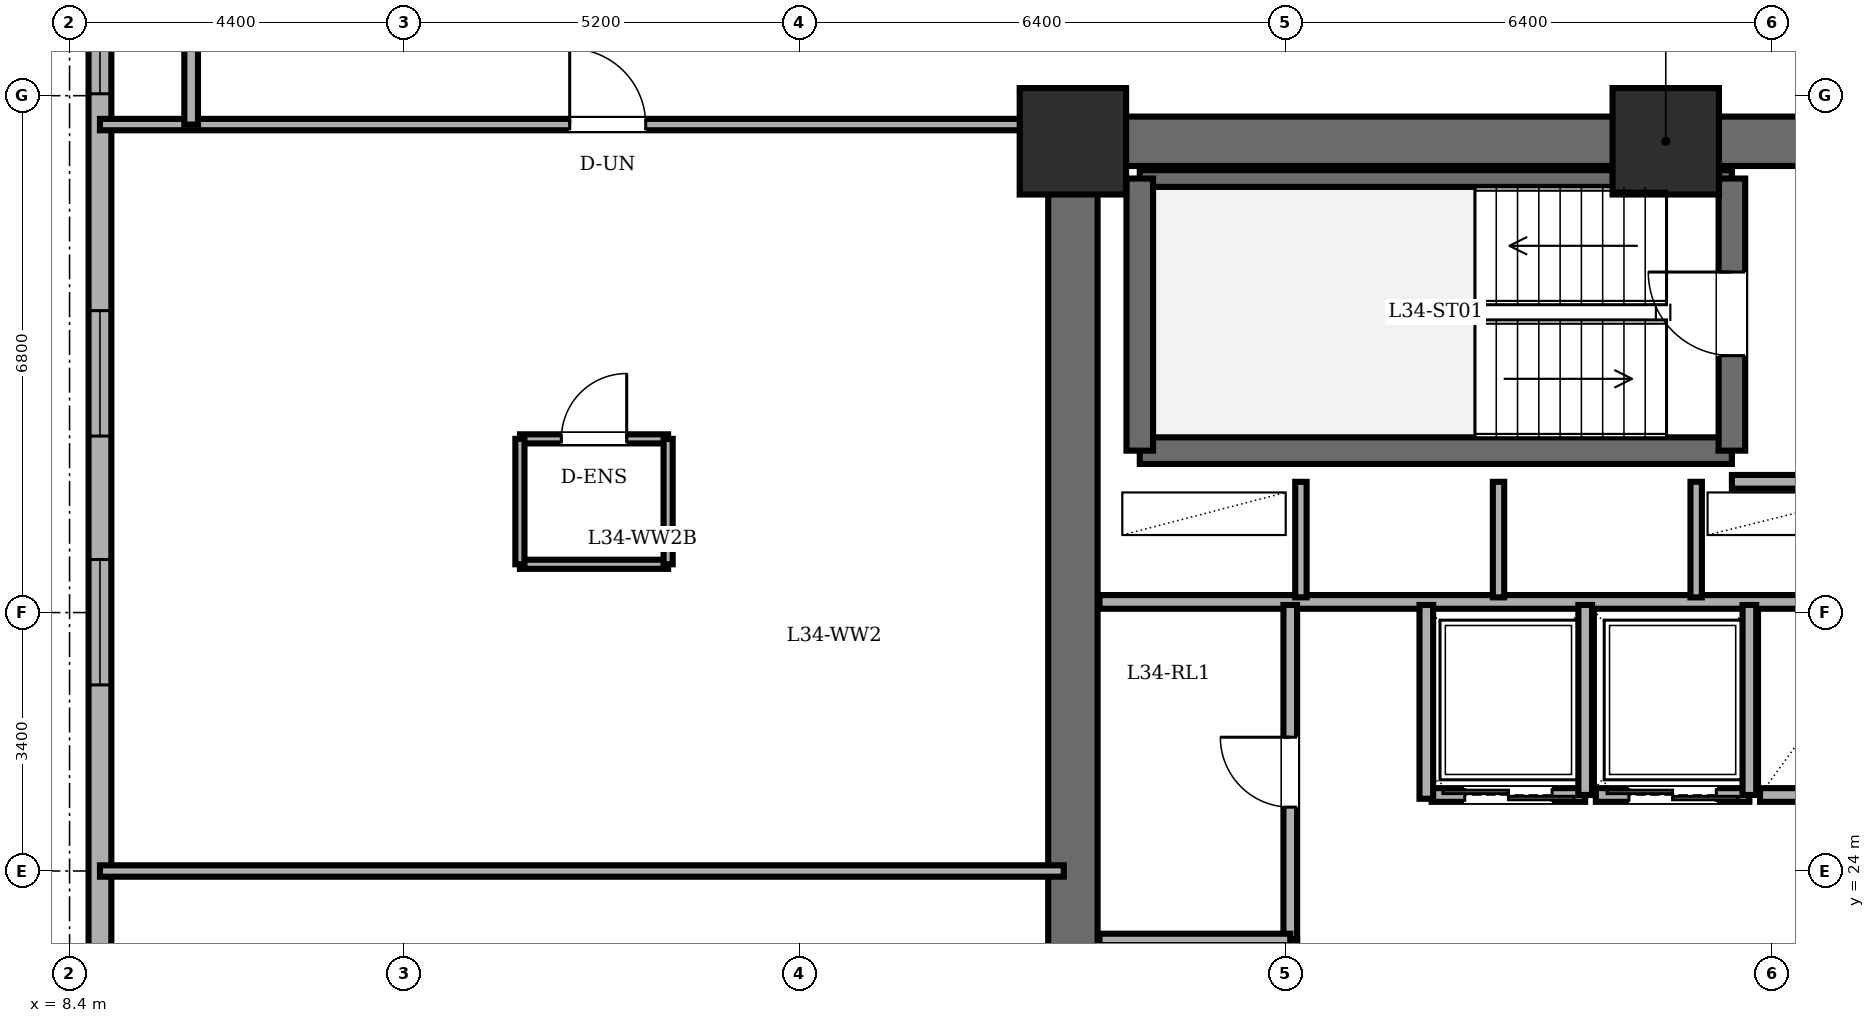
"""IFC4 building model, lengths in metres.
Left out: names, types, materials, properties, quantities, classifications, styles, units other than length and angle.
Written with IfcOpenShell. Run it as: python <this file> out.ifc"""

import sys

from ifc_helpers import new_model, si_unit, direction, frame, frame_2d, origin, origin_2d, place, context, subcontext, project, spatial, rectangle, extrude, element, fill, save


model = new_model("IFC4")
c1 = context("Model", 3, precision=1e-05, world=origin(), true_north=direction((0.0, 1.0)))
c2 = subcontext(c1, "Body", "Model", "MODEL_VIEW")
j1 = project(units=[si_unit("LENGTHUNIT", "METRE"), si_unit("PLANEANGLEUNIT", "RADIAN")], contexts=[c1])
p1 = place(None, origin())
s1 = spatial("IfcSite", under=j1, at=p1, CompositionType="ELEMENT")
p2 = place(p1, origin())
s2 = spatial("IfcBuilding", under=s1, at=p2, CompositionType="ELEMENT")
p3 = place(p2, frame((0.0, 0.0, 129.5)))
s3 = spatial("IfcBuildingStorey", under=s2, at=p3, CompositionType="ELEMENT", Elevation=129.5)
for number, where, z_axis, x_axis in (
    (1, (29.4, 33.6, 0.0), (0.0, 0.0, 1.0), (1.0, 0.0, 0.0)),
    (2, (21.6, 33.6, 0.0), (0.0, 0.0, 1.0), (1.0, 0.0, 0.0)),
):
    element("IfcColumn", number, at=place(p3, frame(where, z_axis=z_axis, x_axis=x_axis)), inside=s3, PredefinedType="COLUMN", context=c2, shape_type="SweptSolid", body=[
        extrude(rectangle(XDim=1.4, YDim=1.4, at=origin_2d()), origin(), (0.0, 0.0, 1.0), 3.6),
    ])
p4 = place(p3, frame((8.8, 38.2, 0.0), z_axis=(0.0, 0.0, 1.0), x_axis=(0.0, -1.0, 0.0)))
e3 = element("IfcWall", 3, at=p4, inside=s3, PredefinedType="SOLIDWALL", context=c2, shape_type="SweptSolid", body=[
    extrude(rectangle(XDim=28.4, YDim=0.3, at=frame_2d((14.2, 0.0))), origin(), (0.0, 0.0, 1.0), 3.36),
])
p5 = place(p4, frame((2.325, 0.0, 0.85)))
e4 = element("IfcOpeningElement", 4, at=p5, cuts=e3, PredefinedType="OPENING", context=c2, shape_type="SweptSolid", body=[
    extrude(rectangle(XDim=1.65, YDim=1.55, at=frame_2d((0.825, 0.775))), frame((0.0, 0.16, 0.0), z_axis=(0.0, -1.0, 0.0), x_axis=(1.0, 0.0, 0.0)), (0.0, 0.0, 1.0), 0.32),
])
p6 = place(p4, frame((6.828, 0.0, 0.85)))
e5 = element("IfcOpeningElement", 5, at=p6, cuts=e3, PredefinedType="OPENING", context=c2, shape_type="SweptSolid", body=[
    extrude(rectangle(XDim=1.65, YDim=1.55, at=frame_2d((0.825, 0.775))), frame((0.0, 0.16, 0.0), z_axis=(0.0, -1.0, 0.0), x_axis=(1.0, 0.0, 0.0)), (0.0, 0.0, 1.0), 0.32),
])
p7 = place(p4, frame((10.102, 0.0, 0.85)))
e6 = element("IfcOpeningElement", 6, at=p7, cuts=e3, PredefinedType="OPENING", context=c2, shape_type="SweptSolid", body=[
    extrude(rectangle(XDim=1.65, YDim=1.55, at=frame_2d((0.825, 0.775))), frame((0.0, 0.16, 0.0), z_axis=(0.0, -1.0, 0.0), x_axis=(1.0, 0.0, 0.0)), (0.0, 0.0, 1.0), 0.32),
])
p8 = place(p4, frame((16.648, 0.0, 0.85)))
e7 = element("IfcOpeningElement", 7, at=p8, cuts=e3, PredefinedType="OPENING", context=c2, shape_type="SweptSolid", body=[
    extrude(rectangle(XDim=1.65, YDim=1.55, at=frame_2d((0.825, 0.775))), frame((0.0, 0.16, 0.0), z_axis=(0.0, -1.0, 0.0), x_axis=(1.0, 0.0, 0.0)), (0.0, 0.0, 1.0), 0.32),
])
p9 = place(p4, frame((19.922, 0.0, 0.85)))
e8 = element("IfcOpeningElement", 8, at=p9, cuts=e3, PredefinedType="OPENING", context=c2, shape_type="SweptSolid", body=[
    extrude(rectangle(XDim=1.65, YDim=1.55, at=frame_2d((0.825, 0.775))), frame((0.0, 0.16, 0.0), z_axis=(0.0, -1.0, 0.0), x_axis=(1.0, 0.0, 0.0)), (0.0, 0.0, 1.0), 0.32),
])
p10 = place(p4, frame((24.425, 0.0, 0.85)))
e9 = element("IfcOpeningElement", 9, at=p10, cuts=e3, PredefinedType="OPENING", context=c2, shape_type="SweptSolid", body=[
    extrude(rectangle(XDim=1.65, YDim=1.55, at=frame_2d((0.825, 0.775))), frame((0.0, 0.16, 0.0), z_axis=(0.0, -1.0, 0.0), x_axis=(1.0, 0.0, 0.0)), (0.0, 0.0, 1.0), 0.32),
])
p11 = place(p3, frame((21.6, 14.4, 0.0), z_axis=(0.0, 0.0, 1.0), x_axis=(0.0, 1.0, 0.0)))
e10 = element("IfcWall", 10, at=p11, inside=s3, PredefinedType="SHEAR", context=c2, shape_type="SweptSolid", body=[
    extrude(rectangle(XDim=19.2, YDim=0.65, at=frame_2d((9.6, 0.0))), origin(), (0.0, 0.0, 1.0), 3.36),
])
p12 = place(p3, frame((21.6, 33.6, 0.0), z_axis=(0.0, 0.0, 1.0), x_axis=(1.0, 0.0, 0.0)))
e11 = element("IfcWall", 11, at=p12, inside=s3, PredefinedType="SHEAR", context=c2, shape_type="SweptSolid", body=[
    extrude(rectangle(XDim=15.6, YDim=0.65, at=frame_2d((7.8, 0.0))), origin(), (0.0, 0.0, 1.0), 3.36),
])
p13 = place(p3, frame((22.48, 29.53, 0.0), z_axis=(0.0, 0.0, 1.0), x_axis=(1.0, 0.0, 0.0)))
e12 = element("IfcWall", 12, at=p13, inside=s3, PredefinedType="SOLIDWALL", context=c2, shape_type="SweptSolid", body=[
    extrude(rectangle(XDim=7.79, YDim=0.35, at=frame_2d((3.895, 0.0))), origin(), (0.0, 0.0, 1.0), 3.36),
])
p14 = place(p3, frame((22.48, 33.11, 0.0), z_axis=(0.0, 0.0, 1.0), x_axis=(1.0, 0.0, 0.0)))
e13 = element("IfcWall", 13, at=p14, inside=s3, PredefinedType="PARTITIONING", context=c2, shape_type="SweptSolid", body=[
    extrude(rectangle(XDim=7.79, YDim=0.22, at=frame_2d((3.895, 0.0))), origin(), (0.0, 0.0, 1.0), 3.36),
])
p15 = place(p3, frame((22.48, 29.53, 0.0), z_axis=(0.0, 0.0, 1.0), x_axis=(0.0, 1.0, 0.0)))
e14 = element("IfcWall", 14, at=p15, inside=s3, PredefinedType="SOLIDWALL", context=c2, shape_type="SweptSolid", body=[
    extrude(rectangle(XDim=3.58, YDim=0.35, at=frame_2d((1.79, 0.0))), origin(), (0.0, 0.0, 1.0), 3.36),
])
p16 = place(p3, frame((30.27, 29.53, 0.0), z_axis=(0.0, 0.0, 1.0), x_axis=(0.0, 1.0, 0.0)))
e15 = element("IfcWall", 15, at=p16, inside=s3, PredefinedType="SOLIDWALL", context=c2, shape_type="SweptSolid", body=[
    extrude(rectangle(XDim=3.58, YDim=0.35, at=frame_2d((1.79, 0.0))), origin(), (0.0, 0.0, 1.0), 3.36),
])
p17 = place(p16, frame((1.25, 0.0, 0.0)))
e16 = element("IfcOpeningElement", 16, at=p17, cuts=e15, PredefinedType="OPENING", context=c2, shape_type="SweptSolid", body=[
    extrude(rectangle(XDim=1.1, YDim=2.15, at=frame_2d((0.55, 1.075))), frame((0.0, 0.185, 0.0), z_axis=(0.0, -1.0, 0.0), x_axis=(1.0, 0.0, 0.0)), (0.0, 0.0, 1.0), 0.37),
])
p18 = place(p3, frame((30.27, 29.12, 0.0), z_axis=(0.0, 0.0, 1.0), x_axis=(1.0, 0.0, 0.0)))
e17 = element("IfcWall", 17, at=p18, inside=s3, PredefinedType="PARTITIONING", context=c2, shape_type="SweptSolid", body=[
    extrude(rectangle(XDim=2.24, YDim=0.18, at=frame_2d((1.12, 0.0))), origin(), (0.0, 0.0, 1.0), 3.36),
])
p19 = place(p3, frame((21.95, 27.54, 0.0), z_axis=(0.0, 0.0, 1.0), x_axis=(1.0, 0.0, 0.0)))
e18 = element("IfcWall", 18, at=p19, inside=s3, PredefinedType="PARTITIONING", context=c2, shape_type="SweptSolid", body=[
    extrude(rectangle(XDim=10.56, YDim=0.18, at=frame_2d((5.28, 0.0))), origin(), (0.0, 0.0, 1.0), 3.36),
])
for number, where, z_axis, x_axis in (
    (19, (24.6, 27.6, 0.0), (0.0, 0.0, 1.0), (0.0, 1.0, 0.0)),
    (20, (27.2, 27.6, 0.0), (0.0, 0.0, 1.0), (0.0, 1.0, 0.0)),
    (21, (29.8, 27.6, 0.0), (0.0, 0.0, 1.0), (0.0, 1.0, 0.0)),
):
    element("IfcWall", number, at=place(p3, frame(where, z_axis=z_axis, x_axis=x_axis)), inside=s3, PredefinedType="PARTITIONING", context=c2, shape_type="SweptSolid", body=[
        extrude(rectangle(XDim=1.52, YDim=0.15, at=frame_2d((0.76, 0.0))), origin(), (0.0, 0.0, 1.0), 3.36),
    ])
p20 = place(p3, frame((28.34, 25.0, 0.0), z_axis=(0.0, 0.0, 1.0), x_axis=(-1.0, 0.0, 0.0)))
e22 = element("IfcWall", 22, at=p20, inside=s3, PredefinedType="PARTITIONING", context=c2, shape_type="SweptSolid", body=[
    extrude(rectangle(XDim=2.02, YDim=0.18, at=frame_2d((1.01, 0.0))), origin(), (0.0, 0.0, 1.0), 3.36),
])
p21 = place(p20, frame((0.435, 0.0, 0.0)))
e23 = element("IfcOpeningElement", 23, at=p21, cuts=e22, PredefinedType="OPENING", context=c2, shape_type="SweptSolid", body=[
    extrude(rectangle(XDim=1.15, YDim=2.2, at=frame_2d((0.575, 1.1))), frame((0.0, 0.1, 0.0), z_axis=(0.0, -1.0, 0.0), x_axis=(1.0, 0.0, 0.0)), (0.0, 0.0, 1.0), 0.2),
])
p22 = place(p3, frame((28.34, 25.0, 0.0), z_axis=(0.0, 0.0, 1.0), x_axis=(0.0, 1.0, 0.0)))
e24 = element("IfcWall", 24, at=p22, inside=s3, PredefinedType="PARTITIONING", context=c2, shape_type="SweptSolid", body=[
    extrude(rectangle(XDim=2.5, YDim=0.18, at=frame_2d((1.25, 0.0))), origin(), (0.0, 0.0, 1.0), 3.36),
])
p23 = place(p3, frame((30.5, 25.0, 0.0), z_axis=(0.0, 0.0, 1.0), x_axis=(-1.0, 0.0, 0.0)))
e25 = element("IfcWall", 25, at=p23, inside=s3, PredefinedType="PARTITIONING", context=c2, shape_type="SweptSolid", body=[
    extrude(rectangle(XDim=2.02, YDim=0.18, at=frame_2d((1.01, 0.0))), origin(), (0.0, 0.0, 1.0), 3.36),
])
p24 = place(p23, frame((0.435, 0.0, 0.0)))
e26 = element("IfcOpeningElement", 26, at=p24, cuts=e25, PredefinedType="OPENING", context=c2, shape_type="SweptSolid", body=[
    extrude(rectangle(XDim=1.15, YDim=2.2, at=frame_2d((0.575, 1.1))), frame((0.0, 0.1, 0.0), z_axis=(0.0, -1.0, 0.0), x_axis=(1.0, 0.0, 0.0)), (0.0, 0.0, 1.0), 0.2),
])
p25 = place(p3, frame((30.5, 25.0, 0.0), z_axis=(0.0, 0.0, 1.0), x_axis=(0.0, 1.0, 0.0)))
e27 = element("IfcWall", 27, at=p25, inside=s3, PredefinedType="PARTITIONING", context=c2, shape_type="SweptSolid", body=[
    extrude(rectangle(XDim=2.5, YDim=0.18, at=frame_2d((1.25, 0.0))), origin(), (0.0, 0.0, 1.0), 3.36),
])
p26 = place(p3, frame((32.46, 25.0, 0.0), z_axis=(0.0, 0.0, 1.0), x_axis=(-1.0, 0.0, 0.0)))
e28 = element("IfcWall", 28, at=p26, inside=s3, PredefinedType="PARTITIONING", context=c2, shape_type="SweptSolid", body=[
    extrude(rectangle(XDim=1.82, YDim=0.18, at=frame_2d((0.91, 0.0))), origin(), (0.0, 0.0, 1.0), 3.36),
])
p27 = place(p3, frame((24.46, 23.1, 0.0), z_axis=(0.0, 0.0, 1.0), x_axis=(0.0, 1.0, 0.0)))
e29 = element("IfcWall", 29, at=p27, inside=s3, PredefinedType="PARTITIONING", context=c2, shape_type="SweptSolid", body=[
    extrude(rectangle(XDim=4.4, YDim=0.18, at=frame_2d((2.2, 0.0))), origin(), (0.0, 0.0, 1.0), 3.36),
])
p28 = place(p27, frame((1.74, 0.0, 0.0)))
e30 = element("IfcOpeningElement", 30, at=p28, cuts=e29, PredefinedType="OPENING", context=c2, shape_type="SweptSolid", body=[
    extrude(rectangle(XDim=0.92, YDim=2.1, at=frame_2d((0.46, 1.05))), frame((0.0, 0.1, 0.0), z_axis=(0.0, -1.0, 0.0), x_axis=(1.0, 0.0, 0.0)), (0.0, 0.0, 1.0), 0.2),
])
p29 = place(p3, frame((24.46, 19.8, 0.0), z_axis=(0.0, 0.0, 1.0), x_axis=(0.0, 1.0, 0.0)))
e31 = element("IfcWall", 31, at=p29, inside=s3, PredefinedType="PARTITIONING", context=c2, shape_type="SweptSolid", body=[
    extrude(rectangle(XDim=3.3, YDim=0.18, at=frame_2d((1.65, 0.0))), origin(), (0.0, 0.0, 1.0), 3.36),
])
p30 = place(p29, frame((1.19, 0.0, 0.0)))
e32 = element("IfcOpeningElement", 32, at=p30, cuts=e31, PredefinedType="OPENING", context=c2, shape_type="SweptSolid", body=[
    extrude(rectangle(XDim=0.92, YDim=2.1, at=frame_2d((0.46, 1.05))), frame((0.0, 0.1, 0.0), z_axis=(0.0, -1.0, 0.0), x_axis=(1.0, 0.0, 0.0)), (0.0, 0.0, 1.0), 0.2),
])
p31 = place(p3, frame((21.95, 23.1, 0.0), z_axis=(0.0, 0.0, 1.0), x_axis=(1.0, 0.0, 0.0)))
e33 = element("IfcWall", 33, at=p31, inside=s3, PredefinedType="PARTITIONING", context=c2, shape_type="SweptSolid", body=[
    extrude(rectangle(XDim=2.51, YDim=0.15, at=frame_2d((1.255, 0.0))), origin(), (0.0, 0.0, 1.0), 3.36),
])
p32 = place(p3, frame((26.25, 24.95, 0.0), z_axis=(0.0, 0.0, 1.0), x_axis=(0.0, 1.0, 0.0)))
e34 = element("IfcWall", 34, at=p32, inside=s3, PredefinedType="PARTITIONING", context=c2, shape_type="SweptSolid", body=[
    extrude(rectangle(XDim=2.55, YDim=0.18, at=frame_2d((1.275, 0.0))), origin(), (0.0, 0.0, 1.0), 3.36),
])
p33 = place(p3, frame((14.325, 29.685, 0.0), z_axis=(0.0, 0.0, 1.0), x_axis=(1.0, 0.0, 0.0)))
e35 = element("IfcWall", 35, at=p33, inside=s3, PredefinedType="PARTITIONING", context=c2, shape_type="SweptSolid", body=[
    extrude(rectangle(XDim=1.95, YDim=0.12, at=frame_2d((0.975, 0.0))), origin(), (0.0, 0.0, 1.0), 3.36),
])
p34 = place(p33, frame((0.545, 0.0, 0.0)))
e36 = element("IfcOpeningElement", 36, at=p34, cuts=e35, PredefinedType="OPENING", context=c2, shape_type="SweptSolid", body=[
    extrude(rectangle(XDim=0.86, YDim=2.1, at=frame_2d((0.43, 1.05))), frame((0.0, 0.07, 0.0), z_axis=(0.0, -1.0, 0.0), x_axis=(1.0, 0.0, 0.0)), (0.0, 0.0, 1.0), 0.14),
])
p35 = place(p3, frame((16.275, 28.035, 0.0), z_axis=(0.0, 0.0, 1.0), x_axis=(-1.0, 0.0, 0.0)))
e37 = element("IfcWall", 37, at=p35, inside=s3, PredefinedType="PARTITIONING", context=c2, shape_type="SweptSolid", body=[
    extrude(rectangle(XDim=1.95, YDim=0.12, at=frame_2d((0.975, 0.0))), origin(), (0.0, 0.0, 1.0), 3.36),
])
for number, where, z_axis, x_axis in (
    (38, (14.325, 29.685, 0.0), (0.0, 0.0, 1.0), (0.0, -1.0, 0.0)),
    (39, (16.275, 28.035, 0.0), (0.0, 0.0, 1.0), (0.0, 1.0, 0.0)),
):
    element("IfcWall", number, at=place(p3, frame(where, z_axis=z_axis, x_axis=x_axis)), inside=s3, PredefinedType="PARTITIONING", context=c2, shape_type="SweptSolid", body=[
        extrude(rectangle(XDim=1.65, YDim=0.12, at=frame_2d((0.825, 0.0))), origin(), (0.0, 0.0, 1.0), 3.36),
    ])
p36 = place(p3, frame((8.8, 24.0, 0.0), z_axis=(0.0, 0.0, 1.0), x_axis=(1.0, 0.0, 0.0)))
e40 = element("IfcWall", 40, at=p36, inside=s3, PredefinedType="PARTITIONING", context=c2, shape_type="SweptSolid", body=[
    extrude(rectangle(XDim=12.68, YDim=0.15, at=frame_2d((6.34, 0.0))), origin(), (0.0, 0.0, 1.0), 3.36),
])
p37 = place(p3, frame((8.8, 33.82, 0.0), z_axis=(0.0, 0.0, 1.0), x_axis=(1.0, 0.0, 0.0)))
e41 = element("IfcWall", 41, at=p37, inside=s3, PredefinedType="PARTITIONING", context=c2, shape_type="SweptSolid", body=[
    extrude(rectangle(XDim=12.68, YDim=0.15, at=frame_2d((6.34, 0.0))), origin(), (0.0, 0.0, 1.0), 3.36),
])
p38 = place(p37, frame((6.18, 0.0, 0.0)))
e42 = element("IfcOpeningElement", 42, at=p38, cuts=e41, PredefinedType="OPENING", context=c2, shape_type="SweptSolid", body=[
    extrude(rectangle(XDim=1.0, YDim=2.15, at=frame_2d((0.5, 1.075))), frame((0.0, 0.085, 0.0), z_axis=(0.0, -1.0, 0.0), x_axis=(1.0, 0.0, 0.0)), (0.0, 0.0, 1.0), 0.17),
])
p39 = place(p3, frame((10.0, 33.82, 0.0), z_axis=(0.0, 0.0, 1.0), x_axis=(0.0, 1.0, 0.0)))
e43 = element("IfcWall", 43, at=p39, inside=s3, PredefinedType="PARTITIONING", context=c2, shape_type="SweptSolid", body=[
    extrude(rectangle(XDim=2.46, YDim=0.18, at=frame_2d((1.23, 0.0))), origin(), (0.0, 0.0, 1.0), 3.36),
])
p40 = place(p5, origin())
e44 = element("IfcWindow", 44, at=p40, inside=s3, PartitioningType="DOUBLE_PANEL_VERTICAL", PredefinedType="WINDOW", context=c2, shape_type="SweptSolid", body=[
    extrude(rectangle(XDim=1.65, YDim=1.55, at=frame_2d((0.825, 0.775))), frame((0.0, 0.03, 0.0), z_axis=(0.0, -1.0, 0.0), x_axis=(1.0, 0.0, 0.0)), (0.0, 0.0, 1.0), 0.06),
])
fill(e4, e44)
p41 = place(p6, origin())
e45 = element("IfcWindow", 45, at=p41, inside=s3, PartitioningType="DOUBLE_PANEL_VERTICAL", PredefinedType="WINDOW", context=c2, shape_type="SweptSolid", body=[
    extrude(rectangle(XDim=1.65, YDim=1.55, at=frame_2d((0.825, 0.775))), frame((0.0, 0.03, 0.0), z_axis=(0.0, -1.0, 0.0), x_axis=(1.0, 0.0, 0.0)), (0.0, 0.0, 1.0), 0.06),
])
fill(e5, e45)
p42 = place(p7, origin())
e46 = element("IfcWindow", 46, at=p42, inside=s3, PartitioningType="DOUBLE_PANEL_VERTICAL", PredefinedType="WINDOW", context=c2, shape_type="SweptSolid", body=[
    extrude(rectangle(XDim=1.65, YDim=1.55, at=frame_2d((0.825, 0.775))), frame((0.0, 0.03, 0.0), z_axis=(0.0, -1.0, 0.0), x_axis=(1.0, 0.0, 0.0)), (0.0, 0.0, 1.0), 0.06),
])
fill(e6, e46)
p43 = place(p17, origin())
e47 = element("IfcDoor", 47, at=p43, inside=s3, OperationType="SINGLE_SWING_RIGHT", PredefinedType="DOOR", context=c2, shape_type="SweptSolid", body=[
    extrude(rectangle(XDim=1.1, YDim=2.15, at=frame_2d((0.55, 1.075))), frame((0.0, 0.025, 0.0), z_axis=(0.0, -1.0, 0.0), x_axis=(1.0, 0.0, 0.0)), (0.0, 0.0, 1.0), 0.05),
])
fill(e16, e47)
p44 = place(p21, origin())
e48 = element("IfcDoor", 48, at=p44, inside=s3, OperationType="DOUBLE_DOOR_SLIDING", PredefinedType="DOOR", context=c2, shape_type="SweptSolid", body=[
    extrude(rectangle(XDim=1.15, YDim=2.2, at=frame_2d((0.575, 1.1))), frame((0.0, 0.025, 0.0), z_axis=(0.0, -1.0, 0.0), x_axis=(1.0, 0.0, 0.0)), (0.0, 0.0, 1.0), 0.05),
])
fill(e23, e48)
p45 = place(p24, origin())
e49 = element("IfcDoor", 49, at=p45, inside=s3, OperationType="DOUBLE_DOOR_SLIDING", PredefinedType="DOOR", context=c2, shape_type="SweptSolid", body=[
    extrude(rectangle(XDim=1.15, YDim=2.2, at=frame_2d((0.575, 1.1))), frame((0.0, 0.025, 0.0), z_axis=(0.0, -1.0, 0.0), x_axis=(1.0, 0.0, 0.0)), (0.0, 0.0, 1.0), 0.05),
])
fill(e26, e49)
p46 = place(p28, origin())
e50 = element("IfcDoor", 50, at=p46, inside=s3, OperationType="SINGLE_SWING_RIGHT", PredefinedType="DOOR", context=c2, shape_type="SweptSolid", body=[
    extrude(rectangle(XDim=0.92, YDim=2.1, at=frame_2d((0.46, 1.05))), frame((0.0, 0.025, 0.0), z_axis=(0.0, -1.0, 0.0), x_axis=(1.0, 0.0, 0.0)), (0.0, 0.0, 1.0), 0.05),
])
fill(e30, e50)
p47 = place(p34, origin())
e51 = element("IfcDoor", 51, at=p47, inside=s3, OperationType="SINGLE_SWING_RIGHT", PredefinedType="DOOR", context=c2, shape_type="SweptSolid", body=[
    extrude(rectangle(XDim=0.86, YDim=2.1, at=frame_2d((0.43, 1.05))), frame((0.0, 0.025, 0.0), z_axis=(0.0, -1.0, 0.0), x_axis=(1.0, 0.0, 0.0)), (0.0, 0.0, 1.0), 0.05),
])
fill(e36, e51)
p48 = place(p38, origin())
e52 = element("IfcDoor", 52, at=p48, inside=s3, OperationType="SINGLE_SWING_LEFT", PredefinedType="DOOR", context=c2, shape_type="SweptSolid", body=[
    extrude(rectangle(XDim=1.0, YDim=2.15, at=frame_2d((0.5, 1.075))), frame((0.0, 0.025, 0.0), z_axis=(0.0, -1.0, 0.0), x_axis=(1.0, 0.0, 0.0)), (0.0, 0.0, 1.0), 0.05),
])
fill(e42, e52)
save(model, sys.argv[1])
